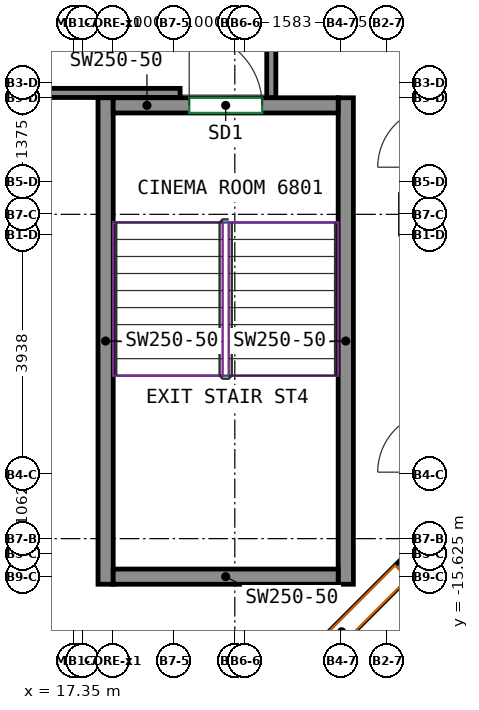
"""IFC4 building model, lengths in metres.
Left out: names, types, materials, properties, quantities, classifications, styles, units other than length and angle.
Written with IfcOpenShell. Run it as: python <this file> out.ifc"""

import sys

from ifc_helpers import new_model, si_unit, direction, frame, frame_2d, origin, place, context, subcontext, project, spatial, rectangle, extrude, source, transform, mapped, element, fill, save


model = new_model("IFC4")
c1 = context("Model", 3, precision=1e-05, world=origin(), true_north=direction((0.0, 1.0)))
c2 = subcontext(c1, "Body", "Model", "MODEL_VIEW")
j1 = project(units=[si_unit("LENGTHUNIT", "METRE"), si_unit("PLANEANGLEUNIT", "RADIAN")], contexts=[c1])
p1 = place(None, origin())
s1 = spatial("IfcSite", under=j1, at=p1, CompositionType="ELEMENT")
p2 = place(p1, origin())
s2 = spatial("IfcBuilding", under=s1, at=p2, CompositionType="ELEMENT")
p3 = place(p2, frame((0.0, 0.0, 277.2)))
s3 = spatial("IfcBuildingStorey", under=s2, at=p3, CompositionType="ELEMENT", Elevation=277.2)
m1 = source(origin(), c2, "Body", "SweptSolid", [
    extrude(rectangle(XDim=8.0, YDim=0.25, at=frame_2d((4.0, 0.0))), origin(), (0.0, 0.0, 1.0), 3.12),
])
for number, where, z_axis, x_axis in (
    (1, (17.875, -15.75, 0.0), (0.0, 0.0, 1.0), (0.0, 1.0, 0.0)),
    (2, (21.825, -15.75, 0.0), (0.0, 0.0, 1.0), (0.0, 1.0, 0.0)),
):
    element("IfcWall", number, at=place(p3, frame(where, z_axis=z_axis, x_axis=x_axis)), inside=s3, PredefinedType="SHEAR", context=c2, shape_type="MappedRepresentation", body=[
        mapped(m1, transform((0.0, 0.0, 0.0))),
    ])
m2 = source(origin(), c2, "Body", "SweptSolid", [
    extrude(rectangle(XDim=3.7, YDim=0.25, at=frame_2d((1.85, 0.0))), origin(), (0.0, 0.0, 1.0), 3.12),
])
p4 = place(p3, frame((18.0, -15.625, 0.0), z_axis=(0.0, 0.0, 1.0), x_axis=(1.0, 0.0, 0.0)))
e3 = element("IfcWall", 3, at=p4, inside=s3, PredefinedType="SHEAR", context=c2, shape_type="MappedRepresentation", body=[
    mapped(m2, transform((0.0, 0.0, 0.0))),
])
p5 = place(p3, frame((18.0, -7.875, 0.0), z_axis=(0.0, 0.0, 1.0), x_axis=(1.0, 0.0, 0.0)))
e4 = element("IfcWall", 4, at=p5, inside=s3, PredefinedType="SHEAR", context=c2, shape_type="MappedRepresentation", body=[
    mapped(m2, transform((0.0, 0.0, 0.0))),
])
p6 = place(p5, frame((1.25, 0.0, 0.0)))
e5 = element("IfcOpeningElement", 5, at=p6, cuts=e4, PredefinedType="OPENING", context=c2, shape_type="SweptSolid", body=[
    extrude(rectangle(XDim=1.2, YDim=2.1, at=frame_2d((0.6, 1.05))), frame((0.0, 0.135, 0.0), z_axis=(0.0, -1.0, 0.0), x_axis=(1.0, 0.0, 0.0)), (0.0, 0.0, 1.0), 0.27),
])
m3 = source(origin(), c2, "Body", "SweptSolid", [
    extrude(rectangle(XDim=3.712, YDim=0.3, at=frame_2d((1.856, 0.0))), origin(), (0.0, 0.0, 1.0), 3.12),
])
p7 = place(p3, frame((20.444, -17.844, 0.0), z_axis=(0.0, 0.0, 1.0), x_axis=(0.707106781187, 0.707106781187, 0.0)))
e6 = element("IfcWall", 6, at=p7, inside=s3, PredefinedType="SOLIDWALL", context=c2, shape_type="MappedRepresentation", body=[
    mapped(m3, transform((0.0, 0.0, 0.0))),
])
p8 = place(p7, frame((1.75, 0.0, 0.8)))
e7 = element("IfcOpeningElement", 7, at=p8, cuts=e6, PredefinedType="OPENING", context=c2, shape_type="SweptSolid", body=[
    extrude(rectangle(XDim=1.5, YDim=2.05, at=frame_2d((0.75, 1.025))), frame((0.0, 0.16, 0.0), z_axis=(0.0, -1.0, 0.0), x_axis=(1.0, 0.0, 0.0)), (0.0, 0.0, 1.0), 0.32),
])
p9 = place(p3, frame((20.6, -7.75, 0.0), z_axis=(0.0, 0.0, 1.0), x_axis=(0.0, 1.0, 0.0)))
e8 = element("IfcWall", 8, at=p9, inside=s3, PredefinedType="PARTITIONING", context=c2, shape_type="SweptSolid", body=[
    extrude(rectangle(XDim=1.775, YDim=0.15, at=frame_2d((0.887, 0.0))), origin(), (0.0, 0.0, 1.0), 3.12),
])
p10 = place(p3, frame((9.49, -7.67, 0.0), z_axis=(0.0, 0.0, 1.0), x_axis=(1.0, 0.0, 0.0)))
e9 = element("IfcWall", 9, at=p10, inside=s3, PredefinedType="PARTITIONING", context=c2, shape_type="SweptSolid", body=[
    extrude(rectangle(XDim=9.61, YDim=0.15, at=frame_2d((4.805, 0.0))), origin(), (0.0, 0.0, 1.0), 3.12),
])
p11 = place(p10, frame((3.304, 0.0, 0.0)))
e10 = element("IfcOpeningElement", 10, at=p11, cuts=e9, PredefinedType="OPENING", context=c2, shape_type="SweptSolid", body=[
    extrude(rectangle(XDim=0.9, YDim=2.1, at=frame_2d((0.45, 1.05))), frame((0.0, 0.085, 0.0), z_axis=(0.0, -1.0, 0.0), x_axis=(1.0, 0.0, 0.0)), (0.0, 0.0, 1.0), 0.17),
])
p12 = place(p8, origin())
e11 = element("IfcWindow", 11, at=p12, inside=s3, PartitioningType="SINGLE_PANEL", PredefinedType="WINDOW", context=c2, shape_type="SweptSolid", body=[
    extrude(rectangle(XDim=1.5, YDim=2.05, at=frame_2d((0.75, 1.025))), frame((0.0, 0.03, 0.0), z_axis=(0.0, -1.0, 0.0), x_axis=(1.0, 0.0, 0.0)), (0.0, 0.0, 1.0), 0.06),
])
fill(e7, e11)
p13 = place(p6, origin())
e12 = element("IfcDoor", 12, at=p13, inside=s3, OperationType="DOUBLE_DOOR_SINGLE_SWING", PredefinedType="DOOR", context=c2, shape_type="SweptSolid", body=[
    extrude(rectangle(XDim=1.2, YDim=2.1, at=frame_2d((0.6, 1.05))), frame((0.0, 0.025, 0.0), z_axis=(0.0, -1.0, 0.0), x_axis=(1.0, 0.0, 0.0)), (0.0, 0.0, 1.0), 0.05),
])
fill(e5, e12)
save(model, sys.argv[1])
